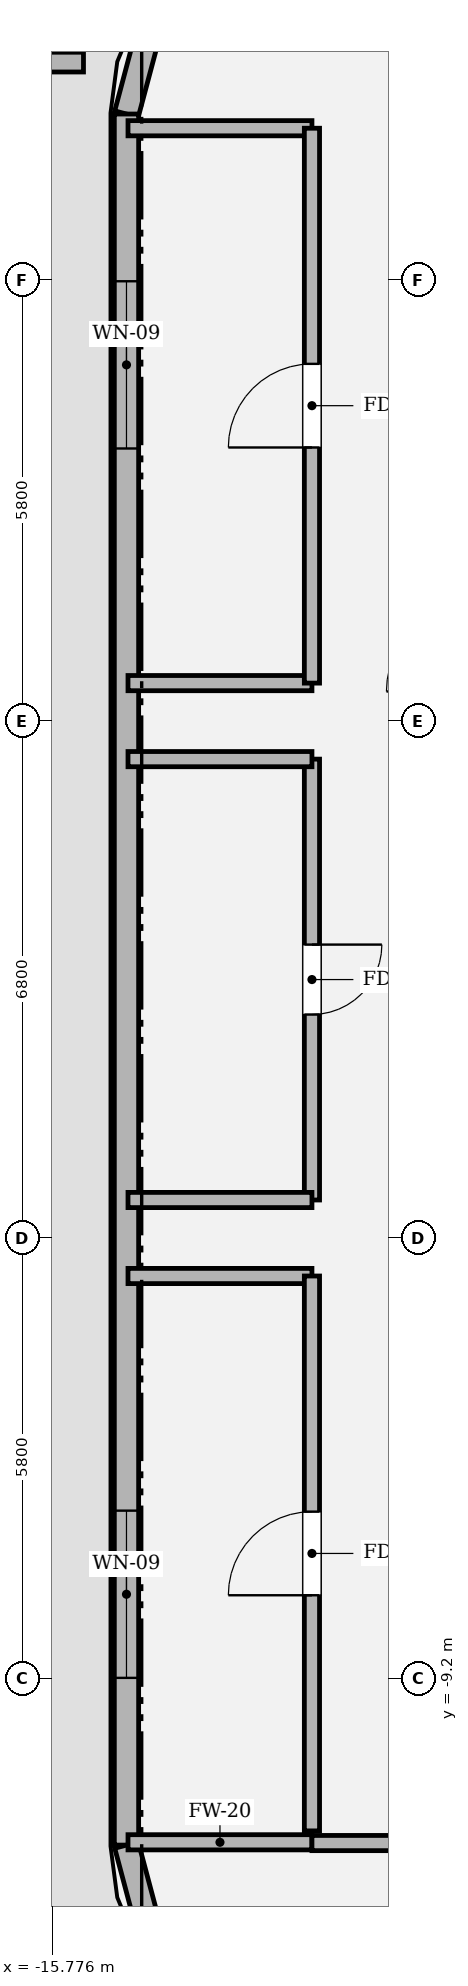
"""IFC4 building model, lengths in metres.
Left out: names, types, materials, properties, quantities, classifications, styles, units other than length and angle.
Written with IfcOpenShell. Run it as: python <this file> out.ifc"""

import sys

from ifc_helpers import new_model, si_unit, direction, frame, frame_2d, origin, place, context, subcontext, project, spatial, rectangle, extrude, element, fill, save


model = new_model("IFC4")
c1 = context("Model", 3, precision=1e-05, world=origin(), true_north=direction((0.0, 1.0)))
c2 = subcontext(c1, "Body", "Model", "MODEL_VIEW")
j1 = project(units=[si_unit("LENGTHUNIT", "METRE"), si_unit("PLANEANGLEUNIT", "RADIAN")], contexts=[c1])
p1 = place(None, origin())
s1 = spatial("IfcSite", under=j1, at=p1, CompositionType="ELEMENT")
p2 = place(p1, origin())
s2 = spatial("IfcBuilding", under=s1, at=p2, CompositionType="ELEMENT")
p3 = place(p2, frame((0.0, 0.0, 237.0)))
s3 = spatial("IfcBuildingStorey", under=s2, at=p3, CompositionType="ELEMENT", Elevation=237.0)
p4 = place(p3, frame((-14.477, 12.599, 0.0), z_axis=(0.0, 0.0, 1.0), x_axis=(-0.25748094776, -0.966283375382, 0.0)))
e1 = element("IfcWall", 1, at=p4, inside=s3, PredefinedType="SOLIDWALL", context=c2, shape_type="SweptSolid", body=[
    extrude(rectangle(XDim=1.254, YDim=0.32, at=frame_2d((0.627, 0.0))), origin(), (0.0, 0.0, 1.0), 3.194),
])
p5 = place(p3, frame((-14.8, 11.387, 0.0), z_axis=(0.0, 0.0, 1.0), x_axis=(0.0, -1.0, 0.0)))
e2 = element("IfcWall", 2, at=p5, inside=s3, PredefinedType="SOLIDWALL", context=c2, shape_type="SweptSolid", body=[
    extrude(rectangle(XDim=22.774, YDim=0.32, at=frame_2d((11.387, 0.0))), origin(), (0.0, 0.0, 1.0), 3.194),
])
p6 = place(p5, frame((2.2, 0.0, 0.9)))
e3 = element("IfcOpeningElement", 3, at=p6, cuts=e2, PredefinedType="OPENING", context=c2, shape_type="SweptSolid", body=[
    extrude(rectangle(XDim=2.2, YDim=1.2, at=frame_2d((1.1, 0.6))), frame((0.0, 0.17, 0.0), z_axis=(0.0, -1.0, 0.0), x_axis=(1.0, 0.0, 0.0)), (0.0, 0.0, 1.0), 0.34),
])
p7 = place(p5, frame((18.374, 0.0, 0.9)))
e4 = element("IfcOpeningElement", 4, at=p7, cuts=e2, PredefinedType="OPENING", context=c2, shape_type="SweptSolid", body=[
    extrude(rectangle(XDim=2.2, YDim=1.2, at=frame_2d((1.1, 0.6))), frame((0.0, 0.17, 0.0), z_axis=(0.0, -1.0, 0.0), x_axis=(1.0, 0.0, 0.0)), (0.0, 0.0, 1.0), 0.34),
])
p8 = place(p3, frame((-14.8, -11.387, 0.0), z_axis=(0.0, 0.0, 1.0), x_axis=(0.25748094776, -0.966283375382, 0.0)))
e5 = element("IfcWall", 5, at=p8, inside=s3, PredefinedType="SOLIDWALL", context=c2, shape_type="SweptSolid", body=[
    extrude(rectangle(XDim=1.254, YDim=0.32, at=frame_2d((0.627, 0.0))), origin(), (0.0, 0.0, 1.0), 3.194),
])
p9 = place(p3, frame((-15.366, 12.07, 0.0), z_axis=(0.0, 0.0, 1.0), x_axis=(-1.0, 0.0, 0.0)))
e6 = element("IfcWall", 6, at=p9, inside=s3, PredefinedType="PARAPET", context=c2, shape_type="SweptSolid", body=[
    extrude(rectangle(XDim=4.704, YDim=0.26, at=frame_2d((2.352, 0.0))), origin(), (0.0, 0.0, 1.0), 1.2),
])
p10 = place(p3, frame((-14.78, -11.35, 0.0), z_axis=(0.0, 0.0, 1.0), x_axis=(1.0, 0.0, 0.0)))
e7 = element("IfcWall", 7, at=p10, inside=s3, PredefinedType="SOLIDWALL", context=c2, shape_type="SweptSolid", body=[
    extrude(rectangle(XDim=2.42, YDim=0.2, at=frame_2d((1.21, 0.0))), origin(), (0.0, 0.0, 1.0), 3.194),
])
p11 = place(p3, frame((-12.36, -11.36, 0.0), z_axis=(0.0, 0.0, 1.0), x_axis=(1.0, 0.0, 0.0)))
e8 = element("IfcWall", 8, at=p11, inside=s3, PredefinedType="SOLIDWALL", context=c2, shape_type="SweptSolid", body=[
    extrude(rectangle(XDim=8.06, YDim=0.2, at=frame_2d((4.03, 0.0))), origin(), (0.0, 0.0, 1.0), 4.48),
])
p12 = place(p11, frame((3.48, 0.0, 0.0)))
e9 = element("IfcOpeningElement", 9, at=p12, cuts=e8, PredefinedType="OPENING", context=c2, shape_type="SweptSolid", body=[
    extrude(rectangle(XDim=1.1, YDim=2.2, at=frame_2d((0.55, 1.1))), frame((0.0, 0.11, 0.0), z_axis=(0.0, -1.0, 0.0), x_axis=(1.0, 0.0, 0.0)), (0.0, 0.0, 1.0), 0.22),
])
p13 = place(p3, frame((-14.78, -3.9, 0.0), z_axis=(0.0, 0.0, 1.0), x_axis=(1.0, 0.0, 0.0)))
e10 = element("IfcWall", 10, at=p13, inside=s3, PredefinedType="SOLIDWALL", context=c2, shape_type="SweptSolid", body=[
    extrude(rectangle(XDim=2.42, YDim=0.2, at=frame_2d((1.21, 0.0))), origin(), (0.0, 0.0, 1.0), 3.194),
])
p14 = place(p3, frame((-12.36, -3.9, 0.0), z_axis=(0.0, 0.0, 1.0), x_axis=(0.0, -1.0, 0.0)))
e11 = element("IfcWall", 11, at=p14, inside=s3, PredefinedType="SOLIDWALL", context=c2, shape_type="SweptSolid", body=[
    extrude(rectangle(XDim=7.3, YDim=0.2, at=frame_2d((3.65, 0.0))), origin(), (0.0, 0.0, 1.0), 4.48),
])
p15 = place(p14, frame((3.1, 0.0, 0.0)))
e12 = element("IfcOpeningElement", 12, at=p15, cuts=e11, PredefinedType="OPENING", context=c2, shape_type="SweptSolid", body=[
    extrude(rectangle(XDim=1.1, YDim=2.2, at=frame_2d((0.55, 1.1))), frame((0.0, 0.11, 0.0), z_axis=(0.0, -1.0, 0.0), x_axis=(1.0, 0.0, 0.0)), (0.0, 0.0, 1.0), 0.22),
])
p16 = place(p3, frame((-12.36, 2.9, 0.0), z_axis=(0.0, 0.0, 1.0), x_axis=(0.0, -1.0, 0.0)))
e13 = element("IfcWall", 13, at=p16, inside=s3, PredefinedType="SOLIDWALL", context=c2, shape_type="SweptSolid", body=[
    extrude(rectangle(XDim=5.8, YDim=0.2, at=frame_2d((2.9, 0.0))), origin(), (0.0, 0.0, 1.0), 4.48),
])
p17 = place(p16, frame((2.44, 0.0, 0.0)))
e14 = element("IfcOpeningElement", 14, at=p17, cuts=e13, PredefinedType="OPENING", context=c2, shape_type="SweptSolid", body=[
    extrude(rectangle(XDim=0.92, YDim=2.1, at=frame_2d((0.46, 1.05))), frame((0.0, 0.11, 0.0), z_axis=(0.0, -1.0, 0.0), x_axis=(1.0, 0.0, 0.0)), (0.0, 0.0, 1.0), 0.22),
])
for number, where, z_axis, x_axis in (
    (15, (-12.36, -2.9, 0.0), (0.0, 0.0, 1.0), (-1.0, 0.0, 0.0)),
    (16, (-14.78, 2.9, 0.0), (0.0, 0.0, 1.0), (1.0, 0.0, 0.0)),
    (17, (-12.36, 3.9, 0.0), (0.0, 0.0, 1.0), (-1.0, 0.0, 0.0)),
    (18, (-14.78, 11.2, 0.0), (0.0, 0.0, 1.0), (1.0, 0.0, 0.0)),
):
    element("IfcWall", number, at=place(p3, frame(where, z_axis=z_axis, x_axis=x_axis)), inside=s3, PredefinedType="SOLIDWALL", context=c2, shape_type="SweptSolid", body=[
        extrude(rectangle(XDim=2.42, YDim=0.2, at=frame_2d((1.21, 0.0))), origin(), (0.0, 0.0, 1.0), 3.194),
    ])
p18 = place(p3, frame((-12.36, 11.2, 0.0), z_axis=(0.0, 0.0, 1.0), x_axis=(0.0, -1.0, 0.0)))
e19 = element("IfcWall", 19, at=p18, inside=s3, PredefinedType="SOLIDWALL", context=c2, shape_type="SweptSolid", body=[
    extrude(rectangle(XDim=7.3, YDim=0.2, at=frame_2d((3.65, 0.0))), origin(), (0.0, 0.0, 1.0), 4.48),
])
p19 = place(p18, frame((3.1, 0.0, 0.0)))
e20 = element("IfcOpeningElement", 20, at=p19, cuts=e19, PredefinedType="OPENING", context=c2, shape_type="SweptSolid", body=[
    extrude(rectangle(XDim=1.1, YDim=2.2, at=frame_2d((0.55, 1.1))), frame((0.0, 0.11, 0.0), z_axis=(0.0, -1.0, 0.0), x_axis=(1.0, 0.0, 0.0)), (0.0, 0.0, 1.0), 0.22),
])
p20 = place(p6, origin())
e21 = element("IfcWindow", 21, at=p20, inside=s3, PartitioningType="SINGLE_PANEL", PredefinedType="WINDOW", context=c2, shape_type="SweptSolid", body=[
    extrude(rectangle(XDim=2.2, YDim=1.2, at=frame_2d((1.1, 0.6))), frame((0.0, 0.03, 0.0), z_axis=(0.0, -1.0, 0.0), x_axis=(1.0, 0.0, 0.0)), (0.0, 0.0, 1.0), 0.06),
])
fill(e3, e21)
p21 = place(p7, origin())
e22 = element("IfcWindow", 22, at=p21, inside=s3, PartitioningType="SINGLE_PANEL", PredefinedType="WINDOW", context=c2, shape_type="SweptSolid", body=[
    extrude(rectangle(XDim=2.2, YDim=1.2, at=frame_2d((1.1, 0.6))), frame((0.0, 0.03, 0.0), z_axis=(0.0, -1.0, 0.0), x_axis=(1.0, 0.0, 0.0)), (0.0, 0.0, 1.0), 0.06),
])
fill(e4, e22)
p22 = place(p15, origin())
e23 = element("IfcDoor", 23, at=p22, inside=s3, OperationType="SINGLE_SWING_RIGHT", PredefinedType="DOOR", context=c2, shape_type="SweptSolid", body=[
    extrude(rectangle(XDim=1.1, YDim=2.2, at=frame_2d((0.55, 1.1))), frame((0.0, 0.025, 0.0), z_axis=(0.0, -1.0, 0.0), x_axis=(1.0, 0.0, 0.0)), (0.0, 0.0, 1.0), 0.05),
])
fill(e12, e23)
p23 = place(p17, origin())
e24 = element("IfcDoor", 24, at=p23, inside=s3, OperationType="SINGLE_SWING_LEFT", PredefinedType="DOOR", context=c2, shape_type="SweptSolid", body=[
    extrude(rectangle(XDim=0.92, YDim=2.1, at=frame_2d((0.46, 1.05))), frame((0.0, 0.025, 0.0), z_axis=(0.0, -1.0, 0.0), x_axis=(1.0, 0.0, 0.0)), (0.0, 0.0, 1.0), 0.05),
])
fill(e14, e24)
p24 = place(p19, origin())
e25 = element("IfcDoor", 25, at=p24, inside=s3, OperationType="SINGLE_SWING_RIGHT", PredefinedType="DOOR", context=c2, shape_type="SweptSolid", body=[
    extrude(rectangle(XDim=1.1, YDim=2.2, at=frame_2d((0.55, 1.1))), frame((0.0, 0.025, 0.0), z_axis=(0.0, -1.0, 0.0), x_axis=(1.0, 0.0, 0.0)), (0.0, 0.0, 1.0), 0.05),
])
fill(e20, e25)
save(model, sys.argv[1])
